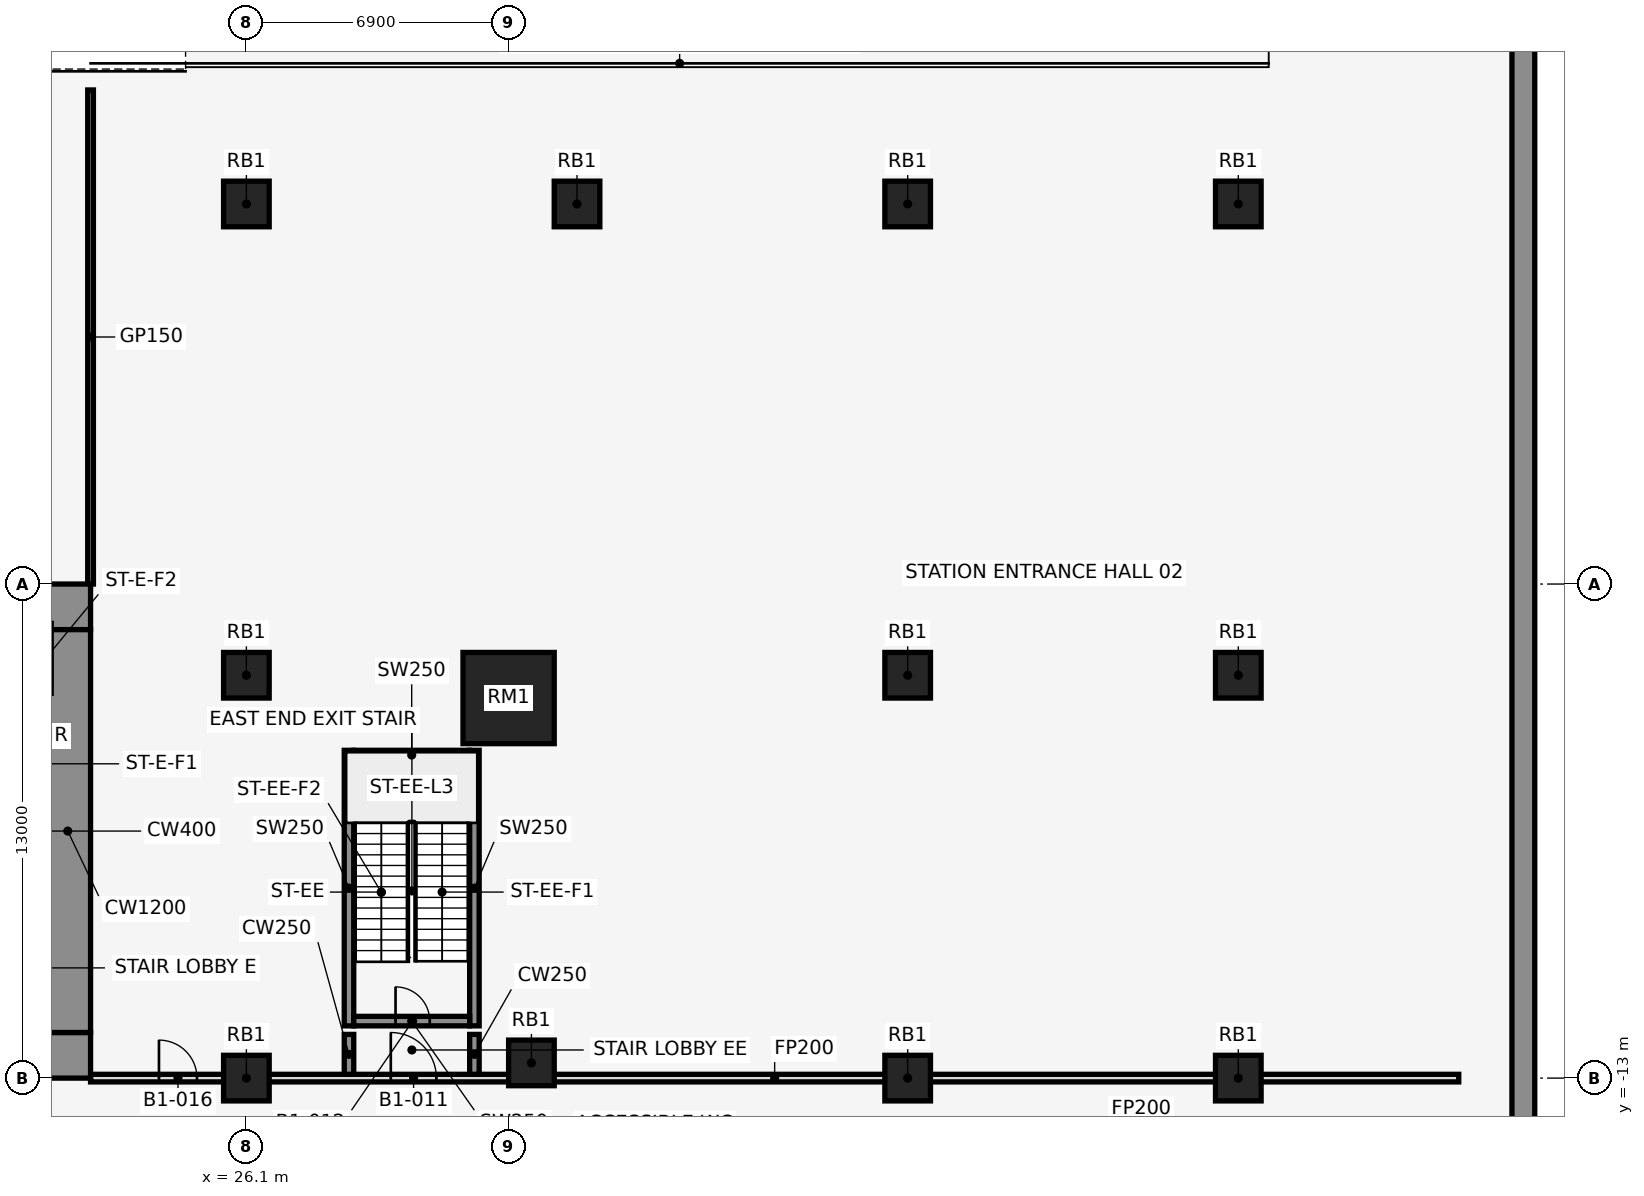
"""IFC4 building model, lengths in metres.
Left out: names, types, materials, properties, quantities, classifications, styles, units other than length and angle.
Written with IfcOpenShell. Run it as: python <this file> out.ifc"""

import sys

from ifc_helpers import new_model, si_unit, direction, frame, frame_2d, origin, origin_2d, place, context, subcontext, project, spatial, rectangle, extrude, element, fill, save


model = new_model("IFC4")
c1 = context("Model", 3, precision=1e-05, world=origin(), true_north=direction((0.0, 1.0)))
c2 = subcontext(c1, "Body", "Model", "MODEL_VIEW")
j1 = project(units=[si_unit("LENGTHUNIT", "METRE"), si_unit("PLANEANGLEUNIT", "RADIAN")], contexts=[c1])
p1 = place(None, origin())
s1 = spatial("IfcSite", under=j1, at=p1, CompositionType="ELEMENT")
p2 = place(p1, origin())
s2 = spatial("IfcBuilding", under=s1, at=p2, CompositionType="ELEMENT")
p3 = place(p2, frame((0.0, 0.0, -5.0)))
s3 = spatial("IfcBuildingStorey", under=s2, at=p3, CompositionType="ELEMENT", Elevation=-5.0)
p4 = place(p3, frame((26.1, -2.4, 0.0), z_axis=(0.0, 0.0, 1.0), x_axis=(1.0, 0.0, 0.0)))
e1 = element("IfcColumn", 1, at=p4, inside=s3, PredefinedType="COLUMN", context=c2, shape_type="SweptSolid", body=[
    extrude(rectangle(XDim=1.2, YDim=1.2, at=origin_2d()), origin(), (0.0, 0.0, 1.0), 5.0),
])
p5 = place(p3, frame((33.0, -3.0, 0.0), z_axis=(0.0, 0.0, 1.0), x_axis=(1.0, 0.0, 0.0)))
e2 = element("IfcColumn", 2, at=p5, inside=s3, PredefinedType="COLUMN", context=c2, shape_type="SweptSolid", body=[
    extrude(rectangle(XDim=2.4, YDim=2.4, at=origin_2d()), origin(), (0.0, 0.0, 1.0), 5.0),
])
p6 = place(p3, frame((33.6, -12.6, 0.0), z_axis=(0.0, 0.0, 1.0), x_axis=(1.0, 0.0, 0.0)))
e3 = element("IfcColumn", 3, at=p6, inside=s3, PredefinedType="COLUMN", context=c2, shape_type="SweptSolid", body=[
    extrude(rectangle(XDim=1.2, YDim=1.2, at=origin_2d()), origin(), (0.0, 0.0, 1.0), 5.0),
])
p7 = place(p3, frame((26.1, 10.0, 0.0), z_axis=(0.0, 0.0, 1.0), x_axis=(1.0, 0.0, 0.0)))
e4 = element("IfcColumn", 4, at=p7, inside=s3, PredefinedType="COLUMN", context=c2, shape_type="SweptSolid", body=[
    extrude(rectangle(XDim=1.2, YDim=1.2, at=origin_2d()), origin(), (0.0, 0.0, 1.0), 4.4),
])
p8 = place(p3, frame((26.1, -13.0, 0.0), z_axis=(0.0, 0.0, 1.0), x_axis=(1.0, 0.0, 0.0)))
e5 = element("IfcColumn", 5, at=p8, inside=s3, PredefinedType="COLUMN", context=c2, shape_type="SweptSolid", body=[
    extrude(rectangle(XDim=1.2, YDim=1.2, at=origin_2d()), origin(), (0.0, 0.0, 1.0), 5.0),
])
for number, where, z_axis, x_axis in (
    (6, (34.8, 10.0, 0.0), (0.0, 0.0, 1.0), (1.0, 0.0, 0.0)),
    (7, (43.5, 10.0, 0.0), (0.0, 0.0, 1.0), (1.0, 0.0, 0.0)),
):
    element("IfcColumn", number, at=place(p3, frame(where, z_axis=z_axis, x_axis=x_axis)), inside=s3, PredefinedType="COLUMN", context=c2, shape_type="SweptSolid", body=[
        extrude(rectangle(XDim=1.2, YDim=1.2, at=origin_2d()), origin(), (0.0, 0.0, 1.0), 4.4),
    ])
for number, where, z_axis, x_axis in (
    (8, (43.5, -2.4, 0.0), (0.0, 0.0, 1.0), (1.0, 0.0, 0.0)),
    (9, (43.5, -13.0, 0.0), (0.0, 0.0, 1.0), (1.0, 0.0, 0.0)),
    (10, (52.2, 10.0, 0.0), (0.0, 0.0, 1.0), (1.0, 0.0, 0.0)),
    (11, (52.2, -2.4, 0.0), (0.0, 0.0, 1.0), (1.0, 0.0, 0.0)),
    (12, (52.2, -13.0, 0.0), (0.0, 0.0, 1.0), (1.0, 0.0, 0.0)),
):
    element("IfcColumn", number, at=place(p3, frame(where, z_axis=z_axis, x_axis=x_axis)), inside=s3, PredefinedType="COLUMN", context=c2, shape_type="SweptSolid", body=[
        extrude(rectangle(XDim=1.2, YDim=1.2, at=origin_2d()), origin(), (0.0, 0.0, 1.0), 5.0),
    ])
p9 = place(p3, frame((59.7, -61.4, 0.0), z_axis=(0.0, 0.0, 1.0), x_axis=(0.0, 1.0, 0.0)))
e13 = element("IfcWall", 13, at=p9, inside=s3, PredefinedType="SOLIDWALL", context=c2, shape_type="SweptSolid", body=[
    extrude(rectangle(XDim=80.8, YDim=0.6, at=frame_2d((40.4, 0.0))), origin(), (0.0, 0.0, 1.0), 5.0),
])
for number, where, z_axis, x_axis in (
    (14, (28.8, -11.625, 0.0), (0.0, 0.0, 1.0), (0.0, 1.0, 0.0)),
    (15, (32.1, -11.625, 0.0), (0.0, 0.0, 1.0), (0.0, 1.0, 0.0)),
):
    element("IfcWall", number, at=place(p3, frame(where, z_axis=z_axis, x_axis=x_axis)), inside=s3, PredefinedType="SHEAR", context=c2, shape_type="SweptSolid", body=[
        extrude(rectangle(XDim=7.25, YDim=0.25, at=frame_2d((3.625, 0.0))), origin(), (0.0, 0.0, 1.0), 5.0),
    ])
p10 = place(p3, frame((28.925, -11.5, 0.0), z_axis=(0.0, 0.0, 1.0), x_axis=(1.0, 0.0, 0.0)))
e16 = element("IfcWall", 16, at=p10, inside=s3, PredefinedType="SHEAR", context=c2, shape_type="SweptSolid", body=[
    extrude(rectangle(XDim=3.05, YDim=0.25, at=frame_2d((1.525, 0.0))), origin(), (0.0, 0.0, 1.0), 5.0),
])
p11 = place(p10, frame((1.1, 0.0, 0.0)))
e17 = element("IfcOpeningElement", 17, at=p11, cuts=e16, PredefinedType="OPENING", context=c2, shape_type="SweptSolid", body=[
    extrude(rectangle(XDim=0.9, YDim=2.1, at=frame_2d((0.45, 1.05))), frame((0.0, 0.137, 0.0), z_axis=(0.0, -1.0, 0.0), x_axis=(1.0, 0.0, 0.0)), (0.0, 0.0, 1.0), 0.274),
])
p12 = place(p3, frame((28.925, -4.5, 0.0), z_axis=(0.0, 0.0, 1.0), x_axis=(1.0, 0.0, 0.0)))
e18 = element("IfcWall", 18, at=p12, inside=s3, PredefinedType="SHEAR", context=c2, shape_type="SweptSolid", body=[
    extrude(rectangle(XDim=3.05, YDim=0.25, at=frame_2d((1.525, 0.0))), origin(), (0.0, 0.0, 1.0), 5.0),
])
p13 = place(p3, frame((22.0, -13.0, 0.0), z_axis=(0.0, 0.0, 1.0), x_axis=(1.0, 0.0, 0.0)))
e19 = element("IfcWall", 19, at=p13, inside=s3, PredefinedType="PARTITIONING", context=c2, shape_type="SweptSolid", body=[
    extrude(rectangle(XDim=36.0, YDim=0.2, at=frame_2d((18.0, 0.0))), origin(), (0.0, 0.0, 1.0), 4.7),
])
p14 = place(p13, frame((7.9, 0.0, 0.0)))
e20 = element("IfcOpeningElement", 20, at=p14, cuts=e19, PredefinedType="OPENING", context=c2, shape_type="SweptSolid", body=[
    extrude(rectangle(XDim=1.2, YDim=2.1, at=frame_2d((0.6, 1.05))), frame((0.0, 0.112, 0.0), z_axis=(0.0, -1.0, 0.0), x_axis=(1.0, 0.0, 0.0)), (0.0, 0.0, 1.0), 0.224),
])
p15 = place(p13, frame((1.8, 0.0, 0.0)))
e21 = element("IfcOpeningElement", 21, at=p15, cuts=e19, PredefinedType="OPENING", context=c2, shape_type="SweptSolid", body=[
    extrude(rectangle(XDim=1.0, YDim=2.1, at=frame_2d((0.5, 1.05))), frame((0.0, 0.112, 0.0), z_axis=(0.0, -1.0, 0.0), x_axis=(1.0, 0.0, 0.0)), (0.0, 0.0, 1.0), 0.224),
])
p16 = place(p3, frame((22.0, 0.0, 0.0), z_axis=(0.0, 0.0, 1.0), x_axis=(0.0, 1.0, 0.0)))
e22 = element("IfcWall", 22, at=p16, inside=s3, PredefinedType="PARTITIONING", context=c2, shape_type="SweptSolid", body=[
    extrude(rectangle(XDim=13.0, YDim=0.15, at=frame_2d((6.5, 0.0))), origin(), (0.0, 0.0, 1.0), 4.7),
])
for number, where, z_axis, x_axis in (
    (23, (28.8, -12.9, 0.0), (0.0, 0.0, 1.0), (0.0, 1.0, 0.0)),
    (24, (32.1, -12.9, 0.0), (0.0, 0.0, 1.0), (0.0, 1.0, 0.0)),
):
    element("IfcWall", number, at=place(p3, frame(where, z_axis=z_axis, x_axis=x_axis)), inside=s3, PredefinedType="SHEAR", context=c2, shape_type="SweptSolid", body=[
        extrude(rectangle(XDim=1.05, YDim=0.25, at=frame_2d((0.525, 0.0))), origin(), (0.0, 0.0, 1.0), 5.0),
    ])
p17 = place(p3, frame((-22.0, -0.6, 0.0), z_axis=(0.0, 0.0, 1.0), x_axis=(1.0, 0.0, 0.0)))
e25 = element("IfcWall", 25, at=p17, inside=s3, PredefinedType="SHEAR", context=c2, shape_type="SweptSolid", body=[
    extrude(rectangle(XDim=44.0, YDim=1.2, at=frame_2d((22.0, 0.0))), origin(), (0.0, 0.0, 1.0), 5.0),
])
p18 = place(p3, frame((-22.0, -12.4, 0.0), z_axis=(0.0, 0.0, 1.0), x_axis=(1.0, 0.0, 0.0)))
e26 = element("IfcWall", 26, at=p18, inside=s3, PredefinedType="SHEAR", context=c2, shape_type="SweptSolid", body=[
    extrude(rectangle(XDim=44.0, YDim=1.2, at=frame_2d((22.0, 0.0))), origin(), (0.0, 0.0, 1.0), 5.0),
])
p19 = place(p18, frame((2.2, 0.0, 0.0)))
e27 = element("IfcOpeningElement", 27, at=p19, cuts=e26, PredefinedType="OPENING", context=c2, shape_type="SweptSolid", body=[
    extrude(rectangle(XDim=1.2, YDim=2.1, at=frame_2d((0.6, 1.05))), frame((0.0, 0.612, 0.0), z_axis=(0.0, -1.0, 0.0), x_axis=(1.0, 0.0, 0.0)), (0.0, 0.0, 1.0), 1.224),
])
p20 = place(p18, frame((21.4, 0.0, 0.0)))
e28 = element("IfcOpeningElement", 28, at=p20, cuts=e26, PredefinedType="OPENING", context=c2, shape_type="SweptSolid", body=[
    extrude(rectangle(XDim=1.2, YDim=2.1, at=frame_2d((0.6, 1.05))), frame((0.0, 0.612, 0.0), z_axis=(0.0, -1.0, 0.0), x_axis=(1.0, 0.0, 0.0)), (0.0, 0.0, 1.0), 1.224),
])
p21 = place(p18, frame((40.6, 0.0, 0.0)))
e29 = element("IfcOpeningElement", 29, at=p21, cuts=e26, PredefinedType="OPENING", context=c2, shape_type="SweptSolid", body=[
    extrude(rectangle(XDim=1.2, YDim=2.1, at=frame_2d((0.6, 1.05))), frame((0.0, 0.612, 0.0), z_axis=(0.0, -1.0, 0.0), x_axis=(1.0, 0.0, 0.0)), (0.0, 0.0, 1.0), 1.224),
])
p22 = place(p18, frame((16.0, 0.0, 0.0)))
e30 = element("IfcOpeningElement", 30, at=p22, cuts=e26, PredefinedType="OPENING", context=c2, shape_type="SweptSolid", body=[
    extrude(rectangle(XDim=1.8, YDim=2.1, at=frame_2d((0.9, 1.05))), frame((0.0, 0.612, 0.0), z_axis=(0.0, -1.0, 0.0), x_axis=(1.0, 0.0, 0.0)), (0.0, 0.0, 1.0), 1.224),
])
p23 = place(p18, frame((6.3, 0.0, 0.0)))
e31 = element("IfcOpeningElement", 31, at=p23, cuts=e26, PredefinedType="OPENING", context=c2, shape_type="SweptSolid", body=[
    extrude(rectangle(XDim=1.2, YDim=2.1, at=frame_2d((0.6, 1.05))), frame((0.0, 0.612, 0.0), z_axis=(0.0, -1.0, 0.0), x_axis=(1.0, 0.0, 0.0)), (0.0, 0.0, 1.0), 1.224),
])
p24 = place(p18, frame((26.2, 0.0, 0.0)))
e32 = element("IfcOpeningElement", 32, at=p24, cuts=e26, PredefinedType="OPENING", context=c2, shape_type="SweptSolid", body=[
    extrude(rectangle(XDim=1.8, YDim=2.1, at=frame_2d((0.9, 1.05))), frame((0.0, 0.612, 0.0), z_axis=(0.0, -1.0, 0.0), x_axis=(1.0, 0.0, 0.0)), (0.0, 0.0, 1.0), 1.224),
])
p25 = place(p18, frame((36.5, 0.0, 0.0)))
e33 = element("IfcOpeningElement", 33, at=p25, cuts=e26, PredefinedType="OPENING", context=c2, shape_type="SweptSolid", body=[
    extrude(rectangle(XDim=1.2, YDim=2.1, at=frame_2d((0.6, 1.05))), frame((0.0, 0.612, 0.0), z_axis=(0.0, -1.0, 0.0), x_axis=(1.0, 0.0, 0.0)), (0.0, 0.0, 1.0), 1.224),
])
p26 = place(p3, frame((21.4, -11.8, 0.0), z_axis=(0.0, 0.0, 1.0), x_axis=(0.0, 1.0, 0.0)))
e34 = element("IfcWall", 34, at=p26, inside=s3, PredefinedType="SHEAR", context=c2, shape_type="SweptSolid", body=[
    extrude(rectangle(XDim=10.6, YDim=1.2, at=frame_2d((5.3, 0.0))), origin(), (0.0, 0.0, 1.0), 5.0),
])
p27 = place(p14, origin())
e35 = element("IfcDoor", 35, at=p27, inside=s3, OperationType="SINGLE_SWING_LEFT", PredefinedType="DOOR", context=c2, shape_type="SweptSolid", body=[
    extrude(rectangle(XDim=1.2, YDim=2.1, at=frame_2d((0.6, 1.05))), frame((0.0, 0.025, 0.0), z_axis=(0.0, -1.0, 0.0), x_axis=(1.0, 0.0, 0.0)), (0.0, 0.0, 1.0), 0.05),
])
fill(e20, e35)
p28 = place(p11, origin())
e36 = element("IfcDoor", 36, at=p28, inside=s3, OperationType="SINGLE_SWING_RIGHT", PredefinedType="DOOR", context=c2, shape_type="SweptSolid", body=[
    extrude(rectangle(XDim=0.9, YDim=2.1, at=frame_2d((0.45, 1.05))), frame((0.0, 0.025, 0.0), z_axis=(0.0, -1.0, 0.0), x_axis=(1.0, 0.0, 0.0)), (0.0, 0.0, 1.0), 0.05),
])
fill(e17, e36)
p29 = place(p15, origin())
e37 = element("IfcDoor", 37, at=p29, inside=s3, OperationType="SINGLE_SWING_LEFT", PredefinedType="DOOR", context=c2, shape_type="SweptSolid", body=[
    extrude(rectangle(XDim=1.0, YDim=2.1, at=frame_2d((0.5, 1.05))), frame((0.0, 0.025, 0.0), z_axis=(0.0, -1.0, 0.0), x_axis=(1.0, 0.0, 0.0)), (0.0, 0.0, 1.0), 0.05),
])
fill(e21, e37)
save(model, sys.argv[1])
